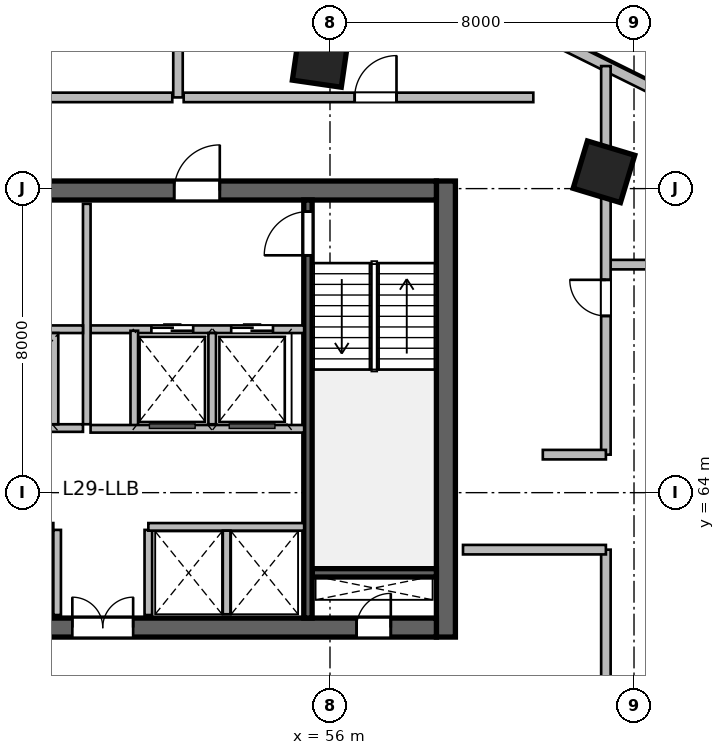
"""IFC4 building model, lengths in metres.
Left out: names, types, materials, properties, quantities, classifications, styles, units other than length and angle.
Written with IfcOpenShell. Run it as: python <this file> out.ifc"""

import sys

from ifc_helpers import new_model, si_unit, direction, frame, frame_2d, origin, origin_2d, place, context, subcontext, project, spatial, rectangle, extrude, source, transform, mapped, element, fill, save


model = new_model("IFC4")
c1 = context("Model", 3, precision=1e-05, world=origin(), true_north=direction((0.0, 1.0)))
c2 = subcontext(c1, "Body", "Model", "MODEL_VIEW")
j1 = project(units=[si_unit("LENGTHUNIT", "METRE"), si_unit("PLANEANGLEUNIT", "RADIAN")], contexts=[c1])
p1 = place(None, origin())
s1 = spatial("IfcSite", under=j1, at=p1, CompositionType="ELEMENT")
p2 = place(p1, origin())
s2 = spatial("IfcBuilding", under=s1, at=p2, CompositionType="ELEMENT")
p3 = place(p2, frame((0.0, 0.0, 123.3)))
s3 = spatial("IfcBuildingStorey", under=s2, at=p3, CompositionType="ELEMENT", Elevation=123.3)
m1 = source(origin(), c2, "Body", "SweptSolid", [
    extrude(rectangle(XDim=12.0, YDim=0.5, at=frame_2d((6.0, 0.0))), origin(), (0.0, 0.0, 1.0), 3.9),
])
p4 = place(p3, frame((59.05, 60.2, 0.0), z_axis=(0.0, 0.0, 1.0), x_axis=(0.0, 1.0, 0.0)))
e1 = element("IfcWall", 1, at=p4, inside=s3, PredefinedType="SHEAR", context=c2, shape_type="MappedRepresentation", body=[
    mapped(m1, transform((0.0, 0.0, 0.0), scale=1.0)),
])
m2 = source(origin(), c2, "Body", "SweptSolid", [
    extrude(rectangle(XDim=21.6, YDim=0.5, at=frame_2d((10.8, 0.0))), origin(), (0.0, 0.0, 1.0), 3.9),
])
p5 = place(p3, frame((37.2, 60.45, 0.0), z_axis=(0.0, 0.0, 1.0), x_axis=(1.0, 0.0, 0.0)))
e2 = element("IfcWall", 2, at=p5, inside=s3, PredefinedType="SHEAR", context=c2, shape_type="MappedRepresentation", body=[
    mapped(m2, transform((0.0, 0.0, 0.0), scale=1.0)),
])
p6 = place(p5, frame((1.1, 0.0, 0.0)))
e3 = element("IfcOpeningElement", 3, at=p6, cuts=e2, PredefinedType="OPENING", context=c2, shape_type="SweptSolid", body=[
    extrude(rectangle(XDim=1.15, YDim=2.15, at=frame_2d((0.575, 1.075))), frame((0.0, 0.26, 0.0), z_axis=(0.0, -1.0, 0.0), x_axis=(1.0, 0.0, 0.0)), (0.0, 0.0, 1.0), 0.52),
])
p7 = place(p5, frame((19.5, 0.0, 0.0)))
e4 = element("IfcOpeningElement", 4, at=p7, cuts=e2, PredefinedType="OPENING", context=c2, shape_type="SweptSolid", body=[
    extrude(rectangle(XDim=0.9, YDim=2.1, at=frame_2d((0.45, 1.05))), frame((0.0, 0.26, 0.0), z_axis=(0.0, -1.0, 0.0), x_axis=(1.0, 0.0, 0.0)), (0.0, 0.0, 1.0), 0.52),
])
p8 = place(p5, frame((12.02, 0.0, 0.0)))
e5 = element("IfcOpeningElement", 5, at=p8, cuts=e2, PredefinedType="OPENING", context=c2, shape_type="SweptSolid", body=[
    extrude(rectangle(XDim=1.6, YDim=2.15, at=frame_2d((0.8, 1.075))), frame((0.0, 0.26, 0.0), z_axis=(0.0, -1.0, 0.0), x_axis=(1.0, 0.0, 0.0)), (0.0, 0.0, 1.0), 0.52),
])
p9 = place(p3, frame((37.2, 71.95, 0.0), z_axis=(0.0, 0.0, 1.0), x_axis=(1.0, 0.0, 0.0)))
e6 = element("IfcWall", 6, at=p9, inside=s3, PredefinedType="SHEAR", context=c2, shape_type="MappedRepresentation", body=[
    mapped(m2, transform((0.0, 0.0, 0.0), scale=1.0)),
])
p10 = place(p9, frame((1.2, 0.0, 0.0)))
e7 = element("IfcOpeningElement", 7, at=p10, cuts=e6, PredefinedType="OPENING", context=c2, shape_type="SweptSolid", body=[
    extrude(rectangle(XDim=0.9, YDim=2.1, at=frame_2d((0.45, 1.05))), frame((0.0, 0.26, 0.0), z_axis=(0.0, -1.0, 0.0), x_axis=(1.0, 0.0, 0.0)), (0.0, 0.0, 1.0), 0.52),
])
p11 = place(p9, frame((14.7, 0.0, 0.0)))
e8 = element("IfcOpeningElement", 8, at=p11, cuts=e6, PredefinedType="OPENING", context=c2, shape_type="SweptSolid", body=[
    extrude(rectangle(XDim=1.2, YDim=2.15, at=frame_2d((0.6, 1.075))), frame((0.0, 0.26, 0.0), z_axis=(0.0, -1.0, 0.0), x_axis=(1.0, 0.0, 0.0)), (0.0, 0.0, 1.0), 0.52),
])
p12 = place(p9, frame((4.15, 0.0, 0.0)))
e9 = element("IfcOpeningElement", 9, at=p12, cuts=e6, PredefinedType="OPENING", context=c2, shape_type="SweptSolid", body=[
    extrude(rectangle(XDim=1.3, YDim=2.15, at=frame_2d((0.65, 1.075))), frame((0.0, 0.26, 0.0), z_axis=(0.0, -1.0, 0.0), x_axis=(1.0, 0.0, 0.0)), (0.0, 0.0, 1.0), 0.52),
])
p13 = place(p9, frame((7.25, 0.0, 0.0)))
e10 = element("IfcOpeningElement", 10, at=p13, cuts=e6, PredefinedType="OPENING", context=c2, shape_type="SweptSolid", body=[
    extrude(rectangle(XDim=0.9, YDim=2.1, at=frame_2d((0.45, 1.05))), frame((0.0, 0.26, 0.0), z_axis=(0.0, -1.0, 0.0), x_axis=(1.0, 0.0, 0.0)), (0.0, 0.0, 1.0), 0.52),
])
m3 = source(origin(), c2, "Body", "SweptSolid", [
    extrude(rectangle(XDim=3.27, YDim=0.22, at=frame_2d((1.635, 0.0))), origin(), (0.0, 0.0, 1.0), 3.9),
])
p14 = place(p3, frame((55.53, 61.89, 0.0), z_axis=(0.0, 0.0, 1.0), x_axis=(1.0, 0.0, 0.0)))
e11 = element("IfcWall", 11, at=p14, inside=s3, PredefinedType="SHEAR", context=c2, shape_type="MappedRepresentation", body=[
    mapped(m3, transform((0.0, 0.0, 0.0), scale=1.0)),
])
m4 = source(origin(), c2, "Body", "SweptSolid", [
    extrude(rectangle(XDim=11.0, YDim=0.22, at=frame_2d((5.5, 0.0))), origin(), (0.0, 0.0, 1.0), 3.9),
])
p15 = place(p3, frame((55.42, 60.7, 0.0), z_axis=(0.0, 0.0, 1.0), x_axis=(0.0, 1.0, 0.0)))
e12 = element("IfcWall", 12, at=p15, inside=s3, PredefinedType="SHEAR", context=c2, shape_type="MappedRepresentation", body=[
    mapped(m4, transform((0.0, 0.0, 0.0), scale=1.0)),
])
p16 = place(p15, frame((9.545, 0.0, 0.0)))
e13 = element("IfcOpeningElement", 13, at=p16, cuts=e12, PredefinedType="OPENING", context=c2, shape_type="SweptSolid", body=[
    extrude(rectangle(XDim=1.15, YDim=2.15, at=frame_2d((0.575, 1.075))), frame((0.0, 0.12, 0.0), z_axis=(0.0, -1.0, 0.0), x_axis=(1.0, 0.0, 0.0)), (0.0, 0.0, 1.0), 0.24),
])
m5 = source(origin(), c2, "Body", "SweptSolid", [
    extrude(rectangle(XDim=1.3, YDim=1.3, at=origin_2d()), origin(), (0.0, 0.0, 1.0), 3.9),
])
for number, where, z_axis, x_axis in (
    (14, (55.747, 75.404, 0.0), (0.0, 0.0, 1.0), (0.143, 0.99, 0.0)),
    (15, (63.209, 72.442, 0.0), (0.0, 0.0, 1.0), (0.289, 0.957, 0.0)),
):
    element("IfcColumn", number, at=place(p3, frame(where, z_axis=z_axis, x_axis=x_axis)), inside=s3, PredefinedType="COLUMN", context=c2, shape_type="MappedRepresentation", body=[
        mapped(m5, transform((0.0, 0.0, 0.0), scale=1.0)),
    ])
m6 = source(origin(), c2, "Body", "SweptSolid", [
    extrude(rectangle(XDim=4.506, YDim=0.28, at=frame_2d((2.253, 0.0))), origin(), (0.0, 0.0, 1.0), 3.65),
])
p17 = place(p3, frame((60.714, 76.497, 0.0), z_axis=(0.0, 0.0, 1.0), x_axis=(0.89597155075, -0.444111450254, 0.0)))
e16 = element("IfcWall", 16, at=p17, inside=s3, PredefinedType="SOLIDWALL", context=c2, shape_type="MappedRepresentation", body=[
    mapped(m6, transform((0.0, 0.0, 0.0), scale=1.0)),
])
m7 = source(origin(), c2, "Body", "SweptSolid", [
    extrude(rectangle(XDim=2.24, YDim=0.2, at=frame_2d((1.12, 0.0))), origin(), (0.0, 0.0, 1.0), 3.65),
])
for number, where, z_axis, x_axis in (
    (17, (48.82, 60.78, 0.0), (0.0, 0.0, 1.0), (0.0, 1.0, 0.0)),
    (18, (51.22, 60.78, 0.0), (0.0, 0.0, 1.0), (0.0, 1.0, 0.0)),
):
    element("IfcWall", number, at=place(p3, frame(where, z_axis=z_axis, x_axis=x_axis)), inside=s3, PredefinedType="SOLIDWALL", context=c2, shape_type="MappedRepresentation", body=[
        mapped(m7, transform((0.0, 0.0, 0.0), scale=1.0)),
    ])
m8 = source(origin(), c2, "Body", "SweptSolid", [
    extrude(rectangle(XDim=5.62, YDim=0.2, at=frame_2d((2.81, 0.0))), origin(), (0.0, 0.0, 1.0), 3.65),
])
p18 = place(p3, frame((49.7, 68.3, 0.0), z_axis=(0.0, 0.0, 1.0), x_axis=(1.0, 0.0, 0.0)))
e19 = element("IfcWall", 19, at=p18, inside=s3, PredefinedType="SOLIDWALL", context=c2, shape_type="MappedRepresentation", body=[
    mapped(m8, transform((0.0, 0.0, 0.0), scale=1.0)),
])
p19 = place(p18, frame((1.6, 0.0, 0.0)))
e20 = element("IfcOpeningElement", 20, at=p19, cuts=e19, PredefinedType="OPENING", context=c2, shape_type="SweptSolid", body=[
    extrude(rectangle(XDim=1.1, YDim=2.15, at=frame_2d((0.55, 1.075))), frame((0.0, 0.11, 0.0), z_axis=(0.0, -1.0, 0.0), x_axis=(1.0, 0.0, 0.0)), (0.0, 0.0, 1.0), 0.22),
])
p20 = place(p18, frame((3.7, 0.0, 0.0)))
e21 = element("IfcOpeningElement", 21, at=p20, cuts=e19, PredefinedType="OPENING", context=c2, shape_type="SweptSolid", body=[
    extrude(rectangle(XDim=1.1, YDim=2.15, at=frame_2d((0.55, 1.075))), frame((0.0, 0.11, 0.0), z_axis=(0.0, -1.0, 0.0), x_axis=(1.0, 0.0, 0.0)), (0.0, 0.0, 1.0), 0.22),
])
m9 = source(origin(), c2, "Body", "SweptSolid", [
    extrude(rectangle(XDim=5.8, YDim=0.2, at=frame_2d((2.9, 0.0))), origin(), (0.0, 0.0, 1.0), 3.65),
])
p21 = place(p3, frame((49.6, 65.8, 0.0), z_axis=(0.0, 0.0, 1.0), x_axis=(0.0, 1.0, 0.0)))
e22 = element("IfcWall", 22, at=p21, inside=s3, PredefinedType="SOLIDWALL", context=c2, shape_type="MappedRepresentation", body=[
    mapped(m9, transform((0.0, 0.0, 0.0), scale=1.0)),
])
m10 = source(origin(), c2, "Body", "SweptSolid", [
    extrude(rectangle(XDim=2.58, YDim=0.2, at=frame_2d((1.29, 0.0))), origin(), (0.0, 0.0, 1.0), 3.65),
])
p22 = place(p3, frame((50.85, 65.68, 0.0), z_axis=(0.0, 0.0, 1.0), x_axis=(0.0, 1.0, 0.0)))
e23 = element("IfcWall", 23, at=p22, inside=s3, PredefinedType="SOLIDWALL", context=c2, shape_type="MappedRepresentation", body=[
    mapped(m10, transform((0.0, 0.0, 0.0), scale=1.0)),
])
m11 = source(origin(), c2, "Body", "SweptSolid", [
    extrude(rectangle(XDim=2.4, YDim=0.2, at=frame_2d((1.2, 0.0))), origin(), (0.0, 0.0, 1.0), 3.65),
])
p23 = place(p3, frame((52.9, 65.8, 0.0), z_axis=(0.0, 0.0, 1.0), x_axis=(0.0, 1.0, 0.0)))
e24 = element("IfcWall", 24, at=p23, inside=s3, PredefinedType="SOLIDWALL", context=c2, shape_type="MappedRepresentation", body=[
    mapped(m11, transform((0.0, 0.0, 0.0), scale=1.0)),
])
p24 = place(p3, frame((49.7, 65.68, 0.0), z_axis=(0.0, 0.0, 1.0), x_axis=(1.0, 0.0, 0.0)))
e25 = element("IfcWall", 25, at=p24, inside=s3, PredefinedType="SOLIDWALL", context=c2, shape_type="MappedRepresentation", body=[
    mapped(m8, transform((0.0, 0.0, 0.0), scale=1.0)),
])
m12 = source(origin(), c2, "Body", "SweptSolid", [
    extrude(rectangle(XDim=8.8, YDim=0.2, at=frame_2d((4.4, 0.0))), origin(), (0.0, 0.0, 1.0), 3.65),
])
p25 = place(p3, frame((40.7, 68.3, 0.0), z_axis=(0.0, 0.0, 1.0), x_axis=(1.0, 0.0, 0.0)))
e26 = element("IfcWall", 26, at=p25, inside=s3, PredefinedType="SOLIDWALL", context=c2, shape_type="MappedRepresentation", body=[
    mapped(m12, transform((0.0, 0.0, 0.0), scale=1.0)),
])
m13 = source(origin(), c2, "Body", "SweptSolid", [
    extrude(rectangle(XDim=8.02, YDim=0.2, at=frame_2d((4.01, 0.0))), origin(), (0.0, 0.0, 1.0), 3.65),
])
p26 = place(p3, frame((40.7, 63.1, 0.0), z_axis=(0.0, 0.0, 1.0), x_axis=(1.0, 0.0, 0.0)))
e27 = element("IfcWall", 27, at=p26, inside=s3, PredefinedType="SOLIDWALL", context=c2, shape_type="MappedRepresentation", body=[
    mapped(m13, transform((0.0, 0.0, 0.0), scale=1.0)),
])
p27 = place(p26, frame((1.6, 0.0, 0.0)))
e28 = element("IfcOpeningElement", 28, at=p27, cuts=e27, PredefinedType="OPENING", context=c2, shape_type="SweptSolid", body=[
    extrude(rectangle(XDim=0.9, YDim=2.1, at=frame_2d((0.45, 1.05))), frame((0.0, 0.11, 0.0), z_axis=(0.0, -1.0, 0.0), x_axis=(1.0, 0.0, 0.0)), (0.0, 0.0, 1.0), 0.22),
])
p28 = place(p26, frame((5.54, 0.0, 0.0)))
e29 = element("IfcOpeningElement", 29, at=p28, cuts=e27, PredefinedType="OPENING", context=c2, shape_type="SweptSolid", body=[
    extrude(rectangle(XDim=0.9, YDim=2.1, at=frame_2d((0.45, 1.05))), frame((0.0, 0.11, 0.0), z_axis=(0.0, -1.0, 0.0), x_axis=(1.0, 0.0, 0.0)), (0.0, 0.0, 1.0), 0.22),
])
m14 = source(origin(), c2, "Body", "SweptSolid", [
    extrude(rectangle(XDim=4.1, YDim=0.2, at=frame_2d((2.05, 0.0))), origin(), (0.0, 0.0, 1.0), 3.65),
])
p29 = place(p3, frame((51.22, 63.1, 0.0), z_axis=(0.0, 0.0, 1.0), x_axis=(1.0, 0.0, 0.0)))
e30 = element("IfcWall", 30, at=p29, inside=s3, PredefinedType="SOLIDWALL", context=c2, shape_type="MappedRepresentation", body=[
    mapped(m14, transform((0.0, 0.0, 0.0), scale=1.0)),
])
m15 = source(origin(), c2, "Body", "SweptSolid", [
    extrude(rectangle(XDim=2.2, YDim=0.2, at=frame_2d((1.1, 0.0))), origin(), (0.0, 0.0, 1.0), 3.65),
])
p30 = place(p3, frame((53.28, 60.8, 0.0), z_axis=(0.0, 0.0, 1.0), x_axis=(0.0, 1.0, 0.0)))
e31 = element("IfcWall", 31, at=p30, inside=s3, PredefinedType="SOLIDWALL", context=c2, shape_type="MappedRepresentation", body=[
    mapped(m15, transform((0.0, 0.0, 0.0), scale=1.0)),
])
p31 = place(p3, frame((40.7, 65.7, 0.0), z_axis=(0.0, 0.0, 1.0), x_axis=(1.0, 0.0, 0.0)))
e32 = element("IfcWall", 32, at=p31, inside=s3, PredefinedType="SOLIDWALL", context=c2, shape_type="MappedRepresentation", body=[
    mapped(m12, transform((0.0, 0.0, 0.0), scale=1.0)),
])
p32 = place(p31, frame((0.72, 0.0, 0.0)))
e33 = element("IfcOpeningElement", 33, at=p32, cuts=e32, PredefinedType="OPENING", context=c2, shape_type="SweptSolid", body=[
    extrude(rectangle(XDim=1.0, YDim=2.15, at=frame_2d((0.5, 1.075))), frame((0.0, 0.11, 0.0), z_axis=(0.0, -1.0, 0.0), x_axis=(1.0, 0.0, 0.0)), (0.0, 0.0, 1.0), 0.22),
])
p33 = place(p31, frame((2.62, 0.0, 0.0)))
e34 = element("IfcOpeningElement", 34, at=p33, cuts=e32, PredefinedType="OPENING", context=c2, shape_type="SweptSolid", body=[
    extrude(rectangle(XDim=1.0, YDim=2.15, at=frame_2d((0.5, 1.075))), frame((0.0, 0.11, 0.0), z_axis=(0.0, -1.0, 0.0), x_axis=(1.0, 0.0, 0.0)), (0.0, 0.0, 1.0), 0.22),
])
p34 = place(p31, frame((4.55, 0.0, 0.0)))
e35 = element("IfcOpeningElement", 35, at=p34, cuts=e32, PredefinedType="OPENING", context=c2, shape_type="SweptSolid", body=[
    extrude(rectangle(XDim=1.0, YDim=2.15, at=frame_2d((0.5, 1.075))), frame((0.0, 0.11, 0.0), z_axis=(0.0, -1.0, 0.0), x_axis=(1.0, 0.0, 0.0)), (0.0, 0.0, 1.0), 0.22),
])
p35 = place(p31, frame((6.55, 0.0, 0.0)))
e36 = element("IfcOpeningElement", 36, at=p35, cuts=e32, PredefinedType="OPENING", context=c2, shape_type="SweptSolid", body=[
    extrude(rectangle(XDim=1.0, YDim=2.15, at=frame_2d((0.5, 1.075))), frame((0.0, 0.11, 0.0), z_axis=(0.0, -1.0, 0.0), x_axis=(1.0, 0.0, 0.0)), (0.0, 0.0, 1.0), 0.22),
])
p36 = place(p3, frame((48.75, 65.8, 0.0), z_axis=(0.0, 0.0, 1.0), x_axis=(0.0, 1.0, 0.0)))
e37 = element("IfcWall", 37, at=p36, inside=s3, PredefinedType="SOLIDWALL", context=c2, shape_type="MappedRepresentation", body=[
    mapped(m11, transform((0.0, 0.0, 0.0), scale=1.0)),
])
m16 = source(origin(), c2, "Body", "SweptSolid", [
    extrude(rectangle(XDim=2.5, YDim=0.25, at=frame_2d((1.25, 0.0))), origin(), (0.0, 0.0, 1.0), 3.65),
])
p37 = place(p3, frame((63.3, 70.0, 0.0), z_axis=(0.0, 0.0, 1.0), x_axis=(1.0, 0.0, 0.0)))
e38 = element("IfcWall", 38, at=p37, inside=s3, PredefinedType="PARTITIONING", context=c2, shape_type="MappedRepresentation", body=[
    mapped(m16, transform((0.0, 0.0, 0.0), scale=1.0)),
])
m17 = source(origin(), c2, "Body", "SweptSolid", [
    extrude(rectangle(XDim=7.7, YDim=0.25, at=frame_2d((3.85, 0.0))), origin(), (0.0, 0.0, 1.0), 3.65),
])
p38 = place(p3, frame((44.15, 74.4, 0.0), z_axis=(0.0, 0.0, 1.0), x_axis=(1.0, 0.0, 0.0)))
e39 = element("IfcWall", 39, at=p38, inside=s3, PredefinedType="PARTITIONING", context=c2, shape_type="MappedRepresentation", body=[
    mapped(m17, transform((0.0, 0.0, 0.0), scale=1.0)),
])
p39 = place(p38, frame((3.3, 0.0, 0.0)))
e40 = element("IfcOpeningElement", 40, at=p39, cuts=e39, PredefinedType="OPENING", context=c2, shape_type="SweptSolid", body=[
    extrude(rectangle(XDim=1.1, YDim=2.15, at=frame_2d((0.55, 1.075))), frame((0.0, 0.135, 0.0), z_axis=(0.0, -1.0, 0.0), x_axis=(1.0, 0.0, 0.0)), (0.0, 0.0, 1.0), 0.27),
])
m18 = source(origin(), c2, "Body", "SweptSolid", [
    extrude(rectangle(XDim=4.423, YDim=0.25, at=frame_2d((2.211, 0.0))), origin(), (0.0, 0.0, 1.0), 3.65),
])
p40 = place(p3, frame((52.0, 74.4, 0.0), z_axis=(0.0, 0.0, 1.0), x_axis=(0.0, 1.0, 0.0)))
e41 = element("IfcWall", 41, at=p40, inside=s3, PredefinedType="PARTITIONING", context=c2, shape_type="MappedRepresentation", body=[
    mapped(m18, transform((0.0, 0.0, 0.0), scale=1.0)),
])
m19 = source(origin(), c2, "Body", "SweptSolid", [
    extrude(rectangle(XDim=9.2, YDim=0.25, at=frame_2d((4.6, 0.0))), origin(), (0.0, 0.0, 1.0), 3.022),
])
p41 = place(p3, frame((52.15, 74.4, 0.0), z_axis=(0.0, 0.0, 1.0), x_axis=(1.0, 0.0, 0.0)))
e42 = element("IfcWall", 42, at=p41, inside=s3, PredefinedType="PARTITIONING", context=c2, shape_type="MappedRepresentation", body=[
    mapped(m19, transform((0.0, 0.0, 0.0), scale=1.0)),
])
p42 = place(p41, frame((4.5, 0.0, 0.0)))
e43 = element("IfcOpeningElement", 43, at=p42, cuts=e42, PredefinedType="OPENING", context=c2, shape_type="SweptSolid", body=[
    extrude(rectangle(XDim=1.1, YDim=2.15, at=frame_2d((0.55, 1.075))), frame((0.0, 0.135, 0.0), z_axis=(0.0, -1.0, 0.0), x_axis=(1.0, 0.0, 0.0)), (0.0, 0.0, 1.0), 0.27),
])
m20 = source(origin(), c2, "Body", "SweptSolid", [
    extrude(rectangle(XDim=16.706, YDim=0.25, at=frame_2d((8.353, 0.0))), origin(), (0.0, 0.0, 1.0), 2.942),
])
p43 = place(p3, frame((63.26, 45.794, 0.0), z_axis=(0.0, 0.0, 1.0), x_axis=(0.0, 1.0, 0.0)))
e44 = element("IfcWall", 44, at=p43, inside=s3, PredefinedType="PARTITIONING", context=c2, shape_type="MappedRepresentation", body=[
    mapped(m20, transform((0.0, 0.0, 0.0), scale=1.0)),
])
p44 = place(p43, frame((7.878, 0.0, 0.0)))
e45 = element("IfcOpeningElement", 45, at=p44, cuts=e44, PredefinedType="OPENING", context=c2, shape_type="SweptSolid", body=[
    extrude(rectangle(XDim=0.95, YDim=2.1, at=frame_2d((0.475, 1.05))), frame((0.0, 0.135, 0.0), z_axis=(0.0, -1.0, 0.0), x_axis=(1.0, 0.0, 0.0)), (0.0, 0.0, 1.0), 0.27),
])
m21 = source(origin(), c2, "Body", "SweptSolid", [
    extrude(rectangle(XDim=3.76, YDim=0.25, at=frame_2d((1.88, 0.0))), origin(), (0.0, 0.0, 1.0), 3.65),
])
p45 = place(p3, frame((59.5, 62.5, 0.0), z_axis=(0.0, 0.0, 1.0), x_axis=(1.0, 0.0, 0.0)))
e46 = element("IfcWall", 46, at=p45, inside=s3, PredefinedType="PARTITIONING", context=c2, shape_type="MappedRepresentation", body=[
    mapped(m21, transform((0.0, 0.0, 0.0), scale=1.0)),
])
m22 = source(origin(), c2, "Body", "SweptSolid", [
    extrude(rectangle(XDim=10.224, YDim=0.25, at=frame_2d((5.112, 0.0))), origin(), (0.0, 0.0, 1.0), 3.65),
])
p46 = place(p3, frame((63.26, 65.0, 0.0), z_axis=(0.0, 0.0, 1.0), x_axis=(0.0, 1.0, 0.0)))
e47 = element("IfcWall", 47, at=p46, inside=s3, PredefinedType="PARTITIONING", context=c2, shape_type="MappedRepresentation", body=[
    mapped(m22, transform((0.0, 0.0, 0.0), scale=1.0)),
])
p47 = place(p46, frame((3.65, 0.0, 0.0)))
e48 = element("IfcOpeningElement", 48, at=p47, cuts=e47, PredefinedType="OPENING", context=c2, shape_type="SweptSolid", body=[
    extrude(rectangle(XDim=0.95, YDim=2.1, at=frame_2d((0.475, 1.05))), frame((0.0, 0.135, 0.0), z_axis=(0.0, -1.0, 0.0), x_axis=(1.0, 0.0, 0.0)), (0.0, 0.0, 1.0), 0.27),
])
m23 = source(origin(), c2, "Body", "SweptSolid", [
    extrude(rectangle(XDim=1.66, YDim=0.25, at=frame_2d((0.83, 0.0))), origin(), (0.0, 0.0, 1.0), 3.65),
])
p48 = place(p3, frame((61.6, 65.0, 0.0), z_axis=(0.0, 0.0, 1.0), x_axis=(1.0, 0.0, 0.0)))
e49 = element("IfcWall", 49, at=p48, inside=s3, PredefinedType="PARTITIONING", context=c2, shape_type="MappedRepresentation", body=[
    mapped(m23, transform((0.0, 0.0, 0.0), scale=1.0)),
])
m24 = source(origin(), c2, "Body", "SweptSolid", [
    extrude(rectangle(XDim=0.9, YDim=2.1, at=frame_2d((0.45, 1.05))), frame((0.0, 0.025, 0.0), z_axis=(0.0, -1.0, 0.0), x_axis=(1.0, 0.0, 0.0)), (0.0, 0.0, 1.0), 0.05),
])
p49 = place(p7, origin())
e50 = element("IfcDoor", 50, at=p49, inside=s3, OperationType="SINGLE_SWING_RIGHT", PredefinedType="DOOR", context=c2, shape_type="MappedRepresentation", body=[
    mapped(m24, transform((0.0, 0.0, 0.0), scale=1.0)),
])
fill(e4, e50)
m25 = source(origin(), c2, "Body", "SweptSolid", [
    extrude(rectangle(XDim=1.15, YDim=2.15, at=frame_2d((0.575, 1.075))), frame((0.0, 0.025, 0.0), z_axis=(0.0, -1.0, 0.0), x_axis=(1.0, 0.0, 0.0)), (0.0, 0.0, 1.0), 0.05),
])
p50 = place(p16, origin())
e51 = element("IfcDoor", 51, at=p50, inside=s3, OperationType="SINGLE_SWING_LEFT", PredefinedType="DOOR", context=c2, shape_type="MappedRepresentation", body=[
    mapped(m25, transform((0.0, 0.0, 0.0), scale=1.0)),
])
fill(e13, e51)
m26 = source(origin(), c2, "Body", "SweptSolid", [
    extrude(rectangle(XDim=1.6, YDim=2.15, at=frame_2d((0.8, 1.075))), frame((0.0, 0.025, 0.0), z_axis=(0.0, -1.0, 0.0), x_axis=(1.0, 0.0, 0.0)), (0.0, 0.0, 1.0), 0.05),
])
p51 = place(p8, origin())
e52 = element("IfcDoor", 52, at=p51, inside=s3, OperationType="DOUBLE_DOOR_SINGLE_SWING", PredefinedType="DOOR", context=c2, shape_type="MappedRepresentation", body=[
    mapped(m26, transform((0.0, 0.0, 0.0), scale=1.0)),
])
fill(e5, e52)
m27 = source(origin(), c2, "Body", "SweptSolid", [
    extrude(rectangle(XDim=1.2, YDim=2.15, at=frame_2d((0.6, 1.075))), frame((0.0, 0.025, 0.0), z_axis=(0.0, -1.0, 0.0), x_axis=(1.0, 0.0, 0.0)), (0.0, 0.0, 1.0), 0.05),
])
p52 = place(p11, origin())
e53 = element("IfcDoor", 53, at=p52, inside=s3, OperationType="SINGLE_SWING_RIGHT", PredefinedType="DOOR", context=c2, shape_type="MappedRepresentation", body=[
    mapped(m27, transform((0.0, 0.0, 0.0), scale=1.0)),
])
fill(e8, e53)
m28 = source(origin(), c2, "Body", "SweptSolid", [
    extrude(rectangle(XDim=1.1, YDim=2.15, at=frame_2d((0.55, 1.075))), frame((0.0, 0.025, 0.0), z_axis=(0.0, -1.0, 0.0), x_axis=(1.0, 0.0, 0.0)), (0.0, 0.0, 1.0), 0.05),
])
p53 = place(p19, origin())
e54 = element("IfcDoor", 54, at=p53, inside=s3, OperationType="DOUBLE_DOOR_SLIDING", PredefinedType="DOOR", context=c2, shape_type="MappedRepresentation", body=[
    mapped(m28, transform((0.0, 0.0, 0.0), scale=1.0)),
])
fill(e20, e54)
p54 = place(p20, origin())
e55 = element("IfcDoor", 55, at=p54, inside=s3, OperationType="DOUBLE_DOOR_SLIDING", PredefinedType="DOOR", context=c2, shape_type="MappedRepresentation", body=[
    mapped(m28, transform((0.0, 0.0, 0.0), scale=1.0)),
])
fill(e21, e55)
m29 = source(origin(), c2, "Body", "SweptSolid", [
    extrude(rectangle(XDim=1.1, YDim=2.15, at=frame_2d((0.55, 1.075))), frame((0.0, 0.025, 0.0), z_axis=(0.0, -1.0, 0.0), x_axis=(1.0, 0.0, 0.0)), (0.0, 0.0, 1.0), 0.05),
])
p55 = place(p42, origin())
e56 = element("IfcDoor", 56, at=p55, inside=s3, OperationType="SINGLE_SWING_RIGHT", PredefinedType="DOOR", context=c2, shape_type="MappedRepresentation", body=[
    mapped(m29, transform((0.0, 0.0, 0.0), scale=1.0)),
])
fill(e43, e56)
m30 = source(origin(), c2, "Body", "SweptSolid", [
    extrude(rectangle(XDim=0.95, YDim=2.1, at=frame_2d((0.475, 1.05))), frame((0.0, 0.025, 0.0), z_axis=(0.0, -1.0, 0.0), x_axis=(1.0, 0.0, 0.0)), (0.0, 0.0, 1.0), 0.05),
])
p56 = place(p47, origin())
e57 = element("IfcDoor", 57, at=p56, inside=s3, OperationType="SINGLE_SWING_RIGHT", PredefinedType="DOOR", context=c2, shape_type="MappedRepresentation", body=[
    mapped(m30, transform((0.0, 0.0, 0.0), scale=1.0)),
])
fill(e48, e57)
save(model, sys.argv[1])
